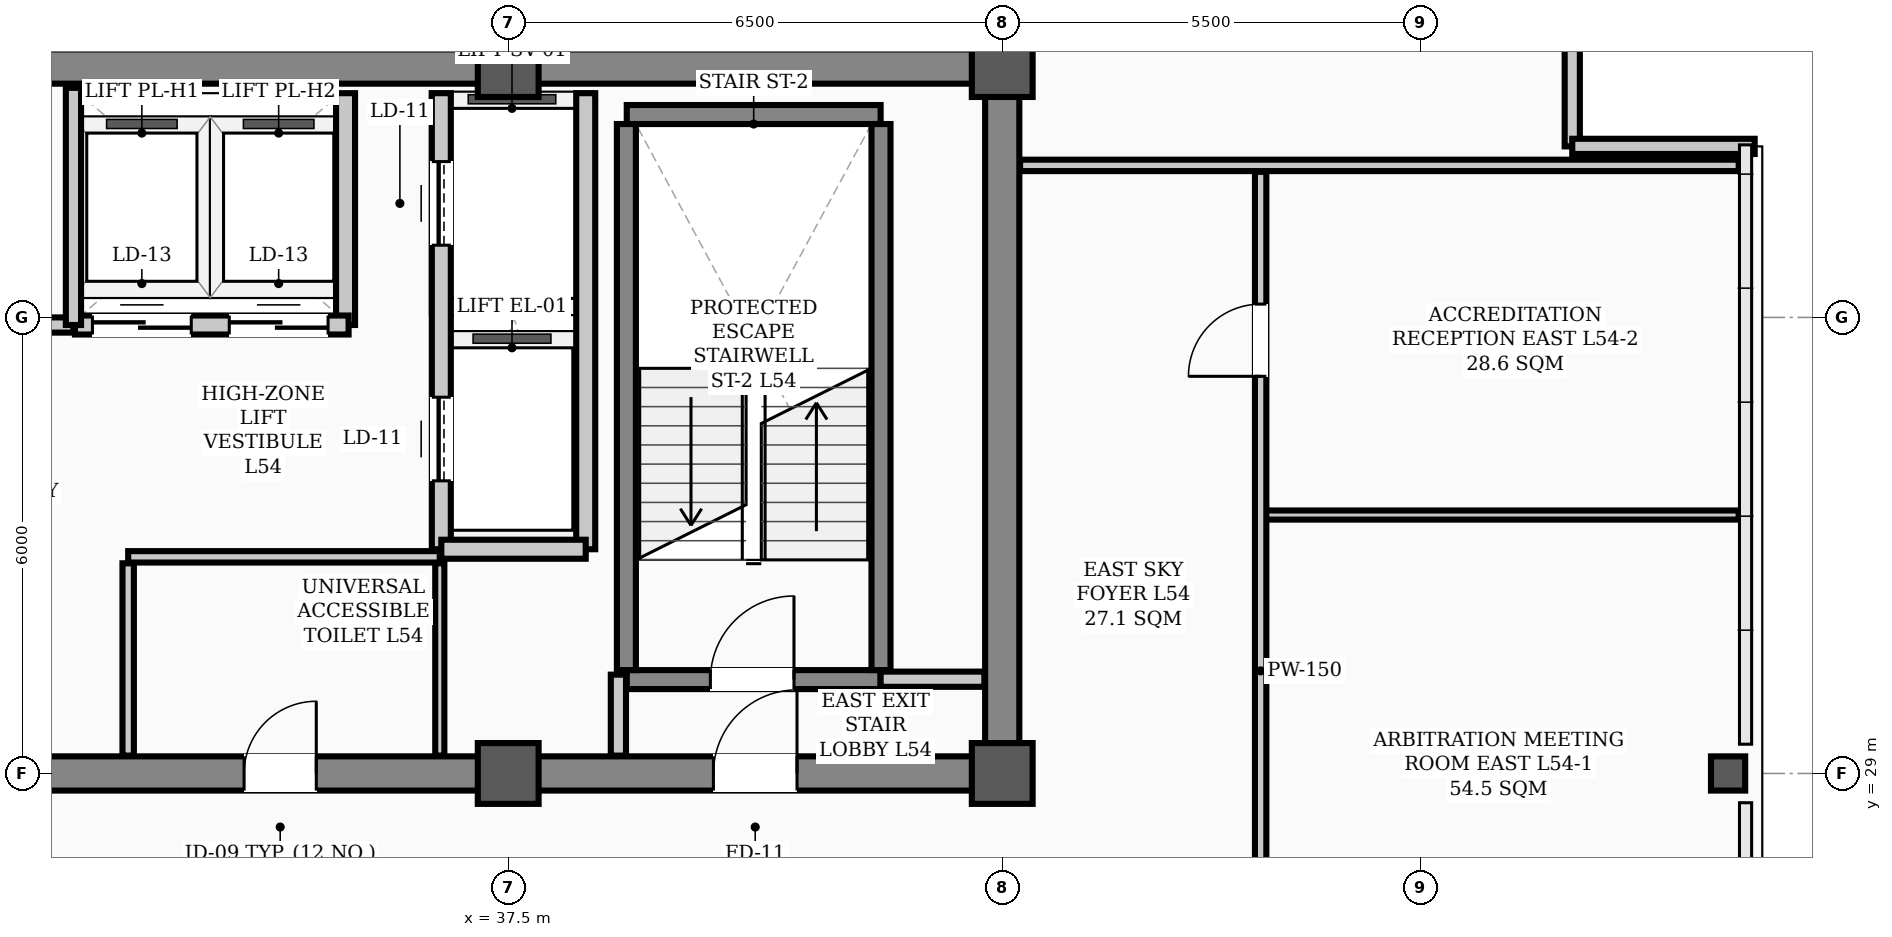
"""IFC4 building model, lengths in metres.
Left out: names, types, materials, properties, quantities, classifications, styles, units other than length and angle.
Written with IfcOpenShell. Run it as: python <this file> out.ifc"""

import sys

from ifc_helpers import new_model, si_unit, direction, frame, frame_2d, origin, origin_2d, place, context, subcontext, project, spatial, rectangle, hollow_rectangle, extrude, element, fill, save


model = new_model("IFC4")
c1 = context("Model", 3, precision=1e-05, world=origin(), true_north=direction((0.0, 1.0)))
c2 = subcontext(c1, "Body", "Model", "MODEL_VIEW")
j1 = project(units=[si_unit("LENGTHUNIT", "METRE"), si_unit("PLANEANGLEUNIT", "RADIAN")], contexts=[c1])
p1 = place(None, origin())
s1 = spatial("IfcSite", under=j1, at=p1, CompositionType="ELEMENT")
p2 = place(p1, origin())
s2 = spatial("IfcBuilding", under=s1, at=p2, CompositionType="ELEMENT")
p3 = place(p2, frame((0.0, 0.0, 218.9)))
s3 = spatial("IfcBuildingStorey", under=s2, at=p3, CompositionType="ELEMENT", Elevation=218.9)
for number, where, z_axis, x_axis in (
    (1, (37.5, 29.0, 0.0), (0.0, 0.0, 1.0), (1.0, 0.0, 0.0)),
    (2, (37.5, 38.3, 0.0), (0.0, 0.0, 1.0), (1.0, 0.0, 0.0)),
    (3, (44.0, 29.0, 0.0), (0.0, 0.0, 1.0), (1.0, 0.0, 0.0)),
    (4, (44.0, 38.3, 0.0), (0.0, 0.0, 1.0), (1.0, 0.0, 0.0)),
):
    element("IfcColumn", number, at=place(p3, frame(where, z_axis=z_axis, x_axis=x_axis)), inside=s3, PredefinedType="COLUMN", context=c2, shape_type="SweptSolid", body=[
        extrude(hollow_rectangle(XDim=0.8, YDim=0.8, WallThickness=0.032, InnerFilletRadius=0.016, OuterFilletRadius=0.048, at=origin_2d()), origin(), (0.0, 0.0, 1.0), 3.9),
    ])
p4 = place(p3, frame((53.55, 29.0, 0.0), z_axis=(0.0, 0.0, 1.0), x_axis=(1.0, 0.0, 0.0)))
e5 = element("IfcColumn", 5, at=p4, inside=s3, PredefinedType="COLUMN", context=c2, shape_type="SweptSolid", body=[
    extrude(hollow_rectangle(XDim=0.45, YDim=0.45, WallThickness=0.022, InnerFilletRadius=0.022, OuterFilletRadius=0.044, at=origin_2d()), origin(), (0.0, 0.0, 1.0), 3.9),
])
for number, where, z_axis, x_axis in (
    (6, (51.5, 39.65, 0.0), (0.0, 0.0, 1.0), (0.0, -1.0, 0.0)),
    (7, (51.5, 37.25, 0.0), (0.0, 0.0, 1.0), (1.0, 0.0, 0.0)),
):
    element("IfcWall", number, at=place(p3, frame(where, z_axis=z_axis, x_axis=x_axis)), inside=s3, PredefinedType="PARAPET", context=c2, shape_type="SweptSolid", body=[
        extrude(rectangle(XDim=2.4, YDim=0.2, at=frame_2d((1.2, 0.0))), origin(), (0.0, 0.0, 1.0), 1.2),
    ])
p5 = place(p3, frame((13.5, 29.0, 0.0), z_axis=(0.0, 0.0, 1.0), x_axis=(1.0, 0.0, 0.0)))
e8 = element("IfcWall", 8, at=p5, inside=s3, PredefinedType="SHEAR", context=c2, shape_type="SweptSolid", body=[
    extrude(rectangle(XDim=30.5, YDim=0.45, at=frame_2d((15.25, 0.0))), origin(), (0.0, 0.0, 1.0), 3.72),
])
p6 = place(p5, frame((1.75, 0.0, 0.0)))
e9 = element("IfcOpeningElement", 9, at=p6, cuts=e8, PredefinedType="OPENING", context=c2, shape_type="SweptSolid", body=[
    extrude(rectangle(XDim=1.1, YDim=2.08, at=frame_2d((0.55, 1.04))), frame((0.0, 0.235, 0.0), z_axis=(0.0, -1.0, 0.0), x_axis=(1.0, 0.0, 0.0)), (0.0, 0.0, 1.0), 0.47),
])
p7 = place(p5, frame((26.7, 0.0, 0.0)))
e10 = element("IfcOpeningElement", 10, at=p7, cuts=e8, PredefinedType="OPENING", context=c2, shape_type="SweptSolid", body=[
    extrude(rectangle(XDim=1.1, YDim=2.08, at=frame_2d((0.55, 1.04))), frame((0.0, 0.235, 0.0), z_axis=(0.0, -1.0, 0.0), x_axis=(1.0, 0.0, 0.0)), (0.0, 0.0, 1.0), 0.47),
])
p8 = place(p5, frame((6.8, 0.0, 0.0)))
e11 = element("IfcOpeningElement", 11, at=p8, cuts=e8, PredefinedType="OPENING", context=c2, shape_type="SweptSolid", body=[
    extrude(rectangle(XDim=1.1, YDim=2.08, at=frame_2d((0.55, 1.04))), frame((0.0, 0.235, 0.0), z_axis=(0.0, -1.0, 0.0), x_axis=(1.0, 0.0, 0.0)), (0.0, 0.0, 1.0), 0.47),
])
p9 = place(p5, frame((13.2, 0.0, 0.0)))
e12 = element("IfcOpeningElement", 12, at=p9, cuts=e8, PredefinedType="OPENING", context=c2, shape_type="SweptSolid", body=[
    extrude(rectangle(XDim=1.6, YDim=2.08, at=frame_2d((0.8, 1.04))), frame((0.0, 0.235, 0.0), z_axis=(0.0, -1.0, 0.0), x_axis=(1.0, 0.0, 0.0)), (0.0, 0.0, 1.0), 0.47),
])
p10 = place(p5, frame((20.525, 0.0, 0.0)))
e13 = element("IfcOpeningElement", 13, at=p10, cuts=e8, PredefinedType="OPENING", context=c2, shape_type="SweptSolid", body=[
    extrude(rectangle(XDim=0.95, YDim=2.08, at=frame_2d((0.475, 1.04))), frame((0.0, 0.235, 0.0), z_axis=(0.0, -1.0, 0.0), x_axis=(1.0, 0.0, 0.0)), (0.0, 0.0, 1.0), 0.47),
])
p11 = place(p3, frame((13.5, 38.3, 0.0), z_axis=(0.0, 0.0, 1.0), x_axis=(1.0, 0.0, 0.0)))
e14 = element("IfcWall", 14, at=p11, inside=s3, PredefinedType="SHEAR", context=c2, shape_type="SweptSolid", body=[
    extrude(rectangle(XDim=30.5, YDim=0.45, at=frame_2d((15.25, 0.0))), origin(), (0.0, 0.0, 1.0), 3.72),
])
p12 = place(p3, frame((44.0, 29.35, 0.0), z_axis=(0.0, 0.0, 1.0), x_axis=(0.0, 1.0, 0.0)))
e15 = element("IfcWall", 15, at=p12, inside=s3, PredefinedType="SHEAR", context=c2, shape_type="SweptSolid", body=[
    extrude(rectangle(XDim=8.6, YDim=0.45, at=frame_2d((4.3, 0.0))), origin(), (0.0, 0.0, 1.0), 3.72),
])
p13 = place(p3, frame((39.06, 30.235, 0.0), z_axis=(0.0, 0.0, 1.0), x_axis=(1.0, 0.0, 0.0)))
e16 = element("IfcWall", 16, at=p13, inside=s3, PredefinedType="STANDARD", context=c2, shape_type="SweptSolid", body=[
    extrude(rectangle(XDim=3.34, YDim=0.25, at=frame_2d((1.67, 0.0))), origin(), (0.0, 0.0, 1.0), 3.72),
])
p14 = place(p13, frame((1.1, 0.0, 0.0)))
e17 = element("IfcOpeningElement", 17, at=p14, cuts=e16, PredefinedType="OPENING", context=c2, shape_type="SweptSolid", body=[
    extrude(rectangle(XDim=1.1, YDim=2.08, at=frame_2d((0.55, 1.04))), frame((0.0, 0.135, 0.0), z_axis=(0.0, -1.0, 0.0), x_axis=(1.0, 0.0, 0.0)), (0.0, 0.0, 1.0), 0.27),
])
p15 = place(p3, frame((39.06, 37.669, 0.0), z_axis=(0.0, 0.0, 1.0), x_axis=(1.0, 0.0, 0.0)))
e18 = element("IfcWall", 18, at=p15, inside=s3, PredefinedType="STANDARD", context=c2, shape_type="SweptSolid", body=[
    extrude(rectangle(XDim=3.34, YDim=0.25, at=frame_2d((1.67, 0.0))), origin(), (0.0, 0.0, 1.0), 3.72),
])
for number, where, z_axis, x_axis in (
    (19, (39.055, 30.36, 0.0), (0.0, 0.0, 1.0), (0.0, 1.0, 0.0)),
    (20, (42.405, 30.36, 0.0), (0.0, 0.0, 1.0), (0.0, 1.0, 0.0)),
):
    element("IfcWall", number, at=place(p3, frame(where, z_axis=z_axis, x_axis=x_axis)), inside=s3, PredefinedType="STANDARD", context=c2, shape_type="SweptSolid", body=[
        extrude(rectangle(XDim=7.184, YDim=0.25, at=frame_2d((3.592, 0.0))), origin(), (0.0, 0.0, 1.0), 3.72),
    ])
p16 = place(p3, frame((36.62, 31.95, 0.0), z_axis=(0.0, 0.0, 1.0), x_axis=(0.0, 1.0, 0.0)))
e21 = element("IfcWall", 21, at=p16, inside=s3, PredefinedType="STANDARD", context=c2, shape_type="SweptSolid", body=[
    extrude(rectangle(XDim=6.0, YDim=0.25, at=frame_2d((3.0, 0.0))), origin(), (0.0, 0.0, 1.0), 3.72),
])
p17 = place(p16, frame((0.9, 0.0, 0.0)))
e22 = element("IfcOpeningElement", 22, at=p17, cuts=e21, PredefinedType="OPENING", context=c2, shape_type="SweptSolid", body=[
    extrude(rectangle(XDim=1.1, YDim=2.08, at=frame_2d((0.55, 1.04))), frame((0.0, 0.135, 0.0), z_axis=(0.0, -1.0, 0.0), x_axis=(1.0, 0.0, 0.0)), (0.0, 0.0, 1.0), 0.27),
])
p18 = place(p16, frame((4.0, 0.0, 0.0)))
e23 = element("IfcOpeningElement", 23, at=p18, cuts=e21, PredefinedType="OPENING", context=c2, shape_type="SweptSolid", body=[
    extrude(rectangle(XDim=1.1, YDim=2.08, at=frame_2d((0.55, 1.04))), frame((0.0, 0.135, 0.0), z_axis=(0.0, -1.0, 0.0), x_axis=(1.0, 0.0, 0.0)), (0.0, 0.0, 1.0), 0.27),
])
p19 = place(p3, frame((38.52, 31.95, 0.0), z_axis=(0.0, 0.0, 1.0), x_axis=(0.0, 1.0, 0.0)))
e24 = element("IfcWall", 24, at=p19, inside=s3, PredefinedType="STANDARD", context=c2, shape_type="SweptSolid", body=[
    extrude(rectangle(XDim=6.0, YDim=0.25, at=frame_2d((3.0, 0.0))), origin(), (0.0, 0.0, 1.0), 3.48),
])
p20 = place(p3, frame((36.62, 31.95, 0.0), z_axis=(0.0, 0.0, 1.0), x_axis=(1.0, 0.0, 0.0)))
e25 = element("IfcWall", 25, at=p20, inside=s3, PredefinedType="STANDARD", context=c2, shape_type="SweptSolid", body=[
    extrude(rectangle(XDim=1.9, YDim=0.25, at=frame_2d((0.95, 0.0))), origin(), (0.0, 0.0, 1.0), 3.48),
])
p21 = place(p3, frame((35.36, 34.9, 0.0), z_axis=(0.0, 0.0, 1.0), x_axis=(0.0, 1.0, 0.0)))
e26 = element("IfcWall", 26, at=p21, inside=s3, PredefinedType="STANDARD", context=c2, shape_type="SweptSolid", body=[
    extrude(rectangle(XDim=3.05, YDim=0.25, at=frame_2d((1.525, 0.0))), origin(), (0.0, 0.0, 1.0), 3.72),
])
p22 = place(p3, frame((31.8, 34.9, 0.0), z_axis=(0.0, 0.0, 1.0), x_axis=(1.0, 0.0, 0.0)))
e27 = element("IfcWall", 27, at=p22, inside=s3, PredefinedType="STANDARD", context=c2, shape_type="SweptSolid", body=[
    extrude(rectangle(XDim=3.6, YDim=0.25, at=frame_2d((1.8, 0.0))), origin(), (0.0, 0.0, 1.0), 3.72),
])
p23 = place(p22, frame((0.23, 0.0, 0.0)))
e28 = element("IfcOpeningElement", 28, at=p23, cuts=e27, PredefinedType="OPENING", context=c2, shape_type="SweptSolid", body=[
    extrude(rectangle(XDim=1.3, YDim=2.08, at=frame_2d((0.65, 1.04))), frame((0.0, 0.135, 0.0), z_axis=(0.0, -1.0, 0.0), x_axis=(1.0, 0.0, 0.0)), (0.0, 0.0, 1.0), 0.27),
])
p24 = place(p22, frame((2.03, 0.0, 0.0)))
e29 = element("IfcOpeningElement", 29, at=p24, cuts=e27, PredefinedType="OPENING", context=c2, shape_type="SweptSolid", body=[
    extrude(rectangle(XDim=1.3, YDim=2.08, at=frame_2d((0.65, 1.04))), frame((0.0, 0.135, 0.0), z_axis=(0.0, -1.0, 0.0), x_axis=(1.0, 0.0, 0.0)), (0.0, 0.0, 1.0), 0.27),
])
p25 = place(p3, frame((42.4, 30.24, 0.0), z_axis=(0.0, 0.0, 1.0), x_axis=(1.0, 0.0, 0.0)))
e30 = element("IfcWall", 30, at=p25, inside=s3, PredefinedType="STANDARD", context=c2, shape_type="SweptSolid", body=[
    extrude(rectangle(XDim=1.365, YDim=0.2, at=frame_2d((0.683, 0.0))), origin(), (0.0, 0.0, 1.0), 3.2),
])
p26 = place(p3, frame((23.6, 34.9, 0.0), z_axis=(0.0, 0.0, 1.0), x_axis=(1.0, 0.0, 0.0)))
e31 = element("IfcWall", 31, at=p26, inside=s3, PredefinedType="STANDARD", context=c2, shape_type="SweptSolid", body=[
    extrude(rectangle(XDim=8.18, YDim=0.2, at=frame_2d((4.09, 0.0))), origin(), (0.0, 0.0, 1.0), 3.72),
])
p27 = place(p26, frame((3.45, 0.0, 0.0)))
e32 = element("IfcOpeningElement", 32, at=p27, cuts=e31, PredefinedType="OPENING", context=c2, shape_type="SweptSolid", body=[
    extrude(rectangle(XDim=1.1, YDim=2.08, at=frame_2d((0.55, 1.04))), frame((0.0, 0.11, 0.0), z_axis=(0.0, -1.0, 0.0), x_axis=(1.0, 0.0, 0.0)), (0.0, 0.0, 1.0), 0.22),
])
p28 = place(p3, frame((32.5, 31.85, 0.0), z_axis=(0.0, 0.0, 1.0), x_axis=(1.0, 0.0, 0.0)))
e33 = element("IfcWall", 33, at=p28, inside=s3, PredefinedType="PARTITIONING", context=c2, shape_type="SweptSolid", body=[
    extrude(rectangle(XDim=4.1, YDim=0.15, at=frame_2d((2.05, 0.0))), origin(), (0.0, 0.0, 1.0), 3.72),
])
p29 = place(p3, frame((44.235, 37.0, 0.0), z_axis=(0.0, 0.0, 1.0), x_axis=(1.0, 0.0, 0.0)))
e34 = element("IfcWall", 34, at=p29, inside=s3, PredefinedType="PARTITIONING", context=c2, shape_type="SweptSolid", body=[
    extrude(rectangle(XDim=9.455, YDim=0.15, at=frame_2d((4.728, 0.0))), origin(), (0.0, 0.0, 1.0), 3.2),
])
p30 = place(p3, frame((47.4, 32.4, 0.0), z_axis=(0.0, 0.0, 1.0), x_axis=(1.0, 0.0, 0.0)))
e35 = element("IfcWall", 35, at=p30, inside=s3, PredefinedType="PARTITIONING", context=c2, shape_type="SweptSolid", body=[
    extrude(rectangle(XDim=6.29, YDim=0.12, at=frame_2d((3.145, 0.0))), origin(), (0.0, 0.0, 1.0), 3.72),
])
p31 = place(p3, frame((38.95, 29.235, 0.0), z_axis=(0.0, 0.0, 1.0), x_axis=(0.0, 1.0, 0.0)))
e36 = element("IfcWall", 36, at=p31, inside=s3, PredefinedType="STANDARD", context=c2, shape_type="SweptSolid", body=[
    extrude(rectangle(XDim=1.065, YDim=0.2, at=frame_2d((0.532, 0.0))), origin(), (0.0, 0.0, 1.0), 3.35),
])
p32 = place(p3, frame((32.5, 29.235, 0.0), z_axis=(0.0, 0.0, 1.0), x_axis=(0.0, 1.0, 0.0)))
e37 = element("IfcWall", 37, at=p32, inside=s3, PredefinedType="PARTITIONING", context=c2, shape_type="SweptSolid", body=[
    extrude(rectangle(XDim=2.53, YDim=0.15, at=frame_2d((1.265, 0.0))), origin(), (0.0, 0.0, 1.0), 3.35),
])
p33 = place(p3, frame((36.6, 29.235, 0.0), z_axis=(0.0, 0.0, 1.0), x_axis=(0.0, 1.0, 0.0)))
e38 = element("IfcWall", 38, at=p33, inside=s3, PredefinedType="PARTITIONING", context=c2, shape_type="SweptSolid", body=[
    extrude(rectangle(XDim=2.53, YDim=0.12, at=frame_2d((1.265, 0.0))), origin(), (0.0, 0.0, 1.0), 3.35),
])
p34 = place(p3, frame((47.4, 23.785, 0.0), z_axis=(0.0, 0.0, 1.0), x_axis=(0.0, 1.0, 0.0)))
e39 = element("IfcWall", 39, at=p34, inside=s3, PredefinedType="PARTITIONING", context=c2, shape_type="SweptSolid", body=[
    extrude(rectangle(XDim=13.13, YDim=0.15, at=frame_2d((6.565, 0.0))), origin(), (0.0, 0.0, 1.0), 3.1),
])
p35 = place(p34, frame((0.64, 0.0, 0.0)))
e40 = element("IfcOpeningElement", 40, at=p35, cuts=e39, PredefinedType="OPENING", context=c2, shape_type="SweptSolid", body=[
    extrude(rectangle(XDim=0.95, YDim=2.08, at=frame_2d((0.475, 1.04))), frame((0.0, 0.085, 0.0), z_axis=(0.0, -1.0, 0.0), x_axis=(1.0, 0.0, 0.0)), (0.0, 0.0, 1.0), 0.17),
])
p36 = place(p34, frame((10.44, 0.0, 0.0)))
e41 = element("IfcOpeningElement", 41, at=p36, cuts=e39, PredefinedType="OPENING", context=c2, shape_type="SweptSolid", body=[
    extrude(rectangle(XDim=0.95, YDim=2.08, at=frame_2d((0.475, 1.04))), frame((0.0, 0.085, 0.0), z_axis=(0.0, -1.0, 0.0), x_axis=(1.0, 0.0, 0.0)), (0.0, 0.0, 1.0), 0.17),
])
p37 = place(p3, frame((31.78, 34.9, 0.0), z_axis=(0.0, 0.0, 1.0), x_axis=(0.0, 1.0, 0.0)))
e42 = element("IfcWall", 42, at=p37, inside=s3, PredefinedType="STANDARD", context=c2, shape_type="SweptSolid", body=[
    extrude(rectangle(XDim=3.12, YDim=0.2, at=frame_2d((1.56, 0.0))), origin(), (0.0, 0.0, 1.0), 3.72),
])
p38 = place(p14, origin())
e43 = element("IfcDoor", 43, at=p38, inside=s3, OperationType="SINGLE_SWING_RIGHT", PredefinedType="DOOR", context=c2, shape_type="SweptSolid", body=[
    extrude(rectangle(XDim=1.1, YDim=2.08, at=frame_2d((0.55, 1.04))), frame((0.0, 0.025, 0.0), z_axis=(0.0, -1.0, 0.0), x_axis=(1.0, 0.0, 0.0)), (0.0, 0.0, 1.0), 0.05),
])
fill(e17, e43)
p39 = place(p7, origin())
e44 = element("IfcDoor", 44, at=p39, inside=s3, OperationType="SINGLE_SWING_RIGHT", PredefinedType="DOOR", context=c2, shape_type="SweptSolid", body=[
    extrude(rectangle(XDim=1.1, YDim=2.08, at=frame_2d((0.55, 1.04))), frame((0.0, 0.025, 0.0), z_axis=(0.0, -1.0, 0.0), x_axis=(1.0, 0.0, 0.0)), (0.0, 0.0, 1.0), 0.05),
])
fill(e10, e44)
p40 = place(p10, origin())
e45 = element("IfcDoor", 45, at=p40, inside=s3, OperationType="SINGLE_SWING_RIGHT", PredefinedType="DOOR", context=c2, shape_type="SweptSolid", body=[
    extrude(rectangle(XDim=0.95, YDim=2.08, at=frame_2d((0.475, 1.04))), frame((0.0, 0.025, 0.0), z_axis=(0.0, -1.0, 0.0), x_axis=(1.0, 0.0, 0.0)), (0.0, 0.0, 1.0), 0.05),
])
fill(e13, e45)
p41 = place(p36, origin())
e46 = element("IfcDoor", 46, at=p41, inside=s3, OperationType="SINGLE_SWING_LEFT", PredefinedType="DOOR", context=c2, shape_type="SweptSolid", body=[
    extrude(rectangle(XDim=0.95, YDim=2.08, at=frame_2d((0.475, 1.04))), frame((0.0, 0.025, 0.0), z_axis=(0.0, -1.0, 0.0), x_axis=(1.0, 0.0, 0.0)), (0.0, 0.0, 1.0), 0.05),
])
fill(e41, e46)
p42 = place(p17, origin())
e47 = element("IfcDoor", 47, at=p42, inside=s3, OperationType="SLIDING_TO_LEFT", PredefinedType="DOOR", context=c2, shape_type="SweptSolid", body=[
    extrude(rectangle(XDim=1.1, YDim=2.08, at=frame_2d((0.55, 1.04))), frame((0.0, 0.025, 0.0), z_axis=(0.0, -1.0, 0.0), x_axis=(1.0, 0.0, 0.0)), (0.0, 0.0, 1.0), 0.05),
])
fill(e22, e47)
p43 = place(p18, origin())
e48 = element("IfcDoor", 48, at=p43, inside=s3, OperationType="SLIDING_TO_LEFT", PredefinedType="DOOR", context=c2, shape_type="SweptSolid", body=[
    extrude(rectangle(XDim=1.1, YDim=2.08, at=frame_2d((0.55, 1.04))), frame((0.0, 0.025, 0.0), z_axis=(0.0, -1.0, 0.0), x_axis=(1.0, 0.0, 0.0)), (0.0, 0.0, 1.0), 0.05),
])
fill(e23, e48)
p44 = place(p23, origin())
e49 = element("IfcDoor", 49, at=p44, inside=s3, OperationType="DOUBLE_DOOR_SLIDING", PredefinedType="DOOR", context=c2, shape_type="SweptSolid", body=[
    extrude(rectangle(XDim=1.3, YDim=2.08, at=frame_2d((0.65, 1.04))), frame((0.0, 0.025, 0.0), z_axis=(0.0, -1.0, 0.0), x_axis=(1.0, 0.0, 0.0)), (0.0, 0.0, 1.0), 0.05),
])
fill(e28, e49)
p45 = place(p24, origin())
e50 = element("IfcDoor", 50, at=p45, inside=s3, OperationType="DOUBLE_DOOR_SLIDING", PredefinedType="DOOR", context=c2, shape_type="SweptSolid", body=[
    extrude(rectangle(XDim=1.3, YDim=2.08, at=frame_2d((0.65, 1.04))), frame((0.0, 0.025, 0.0), z_axis=(0.0, -1.0, 0.0), x_axis=(1.0, 0.0, 0.0)), (0.0, 0.0, 1.0), 0.05),
])
fill(e29, e50)
save(model, sys.argv[1])
